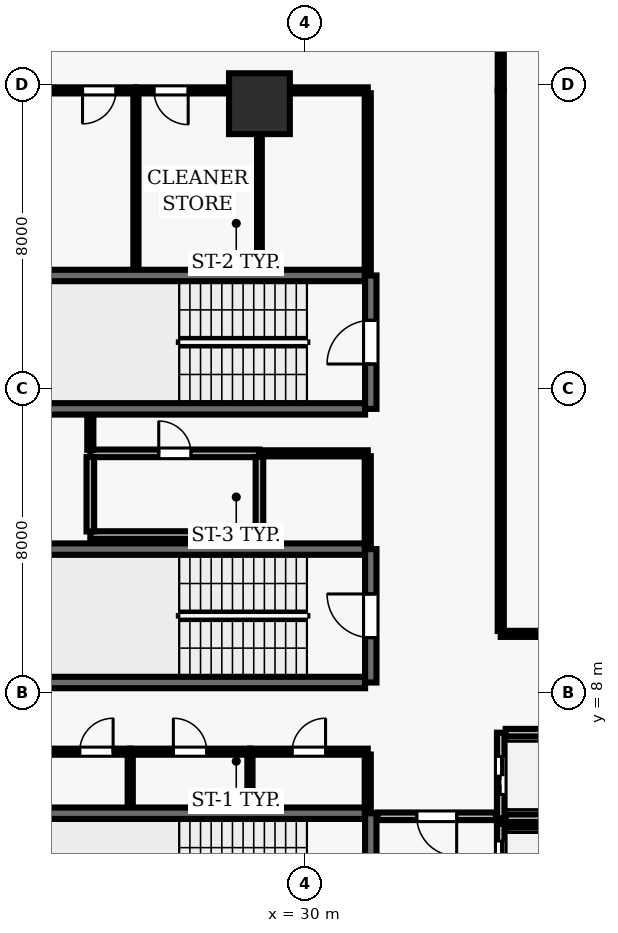
"""IFC4 building model, lengths in metres.
Left out: names, types, materials, properties, quantities, classifications, styles, units other than length and angle.
Written with IfcOpenShell. Run it as: python <this file> out.ifc"""

import sys

from ifc_helpers import new_model, si_unit, direction, frame, frame_2d, origin, origin_2d, place, context, subcontext, project, spatial, rectangle, extrude, element, fill, save


model = new_model("IFC4")
c1 = context("Model", 3, precision=1e-05, world=origin(), true_north=direction((0.0, 1.0)))
c2 = subcontext(c1, "Body", "Model", "MODEL_VIEW")
j1 = project(units=[si_unit("LENGTHUNIT", "METRE"), si_unit("PLANEANGLEUNIT", "RADIAN")], contexts=[c1])
p1 = place(None, origin())
s1 = spatial("IfcSite", under=j1, at=p1, CompositionType="ELEMENT")
p2 = place(p1, origin())
s2 = spatial("IfcBuilding", under=s1, at=p2, CompositionType="ELEMENT")
p3 = place(p2, frame((0.0, 0.0, -9.0)))
s3 = spatial("IfcBuildingStorey", under=s2, at=p3, CompositionType="ELEMENT", Elevation=-9.0)
p4 = place(p3, frame((28.8, 23.5, 0.0), z_axis=(0.0, 0.0, 1.0), x_axis=(1.0, 0.0, 0.0)))
e1 = element("IfcColumn", 1, at=p4, inside=s3, PredefinedType="COLUMN", context=c2, shape_type="SweptSolid", body=[
    extrude(rectangle(XDim=1.6, YDim=1.6, at=origin_2d()), origin(), (0.0, 0.0, 1.0), 4.5),
])
p5 = place(p3, frame((31.58, 4.83, 0.0), z_axis=(0.0, 0.0, 1.0), x_axis=(-1.0, 0.0, 0.0)))
e2 = element("IfcWall", 2, at=p5, inside=s3, PredefinedType="SHEAR", context=c2, shape_type="SweptSolid", body=[
    extrude(rectangle(XDim=8.36, YDim=0.3, at=frame_2d((4.18, 0.0))), origin(), (0.0, 0.0, 1.0), 4.22),
])
p6 = place(p3, frame((31.73, 0.96, 0.0), z_axis=(0.0, 0.0, 1.0), x_axis=(0.0, 1.0, 0.0)))
e3 = element("IfcWall", 3, at=p6, inside=s3, PredefinedType="SHEAR", context=c2, shape_type="SweptSolid", body=[
    extrude(rectangle(XDim=3.87, YDim=0.3, at=frame_2d((1.935, 0.0))), origin(), (0.0, 0.0, 1.0), 4.22),
])
p7 = place(p6, frame((1.54, 0.0, 0.0)))
e4 = element("IfcOpeningElement", 4, at=p7, cuts=e3, PredefinedType="OPENING", context=c2, shape_type="SweptSolid", body=[
    extrude(rectangle(XDim=1.15, YDim=2.15, at=frame_2d((0.575, 1.075))), frame((0.0, 0.16, 0.0), z_axis=(0.0, -1.0, 0.0), x_axis=(1.0, 0.0, 0.0)), (0.0, 0.0, 1.0), 0.32),
])
for number, where, z_axis, x_axis in (
    (5, (31.58, 18.98, 0.0), (0.0, 0.0, 1.0), (-1.0, 0.0, 0.0)),
    (6, (23.22, 15.47, 0.0), (0.0, 0.0, 1.0), (1.0, 0.0, 0.0)),
):
    element("IfcWall", number, at=place(p3, frame(where, z_axis=z_axis, x_axis=x_axis)), inside=s3, PredefinedType="SHEAR", context=c2, shape_type="SweptSolid", body=[
        extrude(rectangle(XDim=8.36, YDim=0.3, at=frame_2d((4.18, 0.0))), origin(), (0.0, 0.0, 1.0), 4.22),
    ])
p8 = place(p3, frame((31.73, 15.47, 0.0), z_axis=(0.0, 0.0, 1.0), x_axis=(0.0, 1.0, 0.0)))
e7 = element("IfcWall", 7, at=p8, inside=s3, PredefinedType="SHEAR", context=c2, shape_type="SweptSolid", body=[
    extrude(rectangle(XDim=3.51, YDim=0.3, at=frame_2d((1.755, 0.0))), origin(), (0.0, 0.0, 1.0), 4.22),
])
p9 = place(p8, frame((1.18, 0.0, 0.0)))
e8 = element("IfcOpeningElement", 8, at=p9, cuts=e7, PredefinedType="OPENING", context=c2, shape_type="SweptSolid", body=[
    extrude(rectangle(XDim=1.15, YDim=2.15, at=frame_2d((0.575, 1.075))), frame((0.0, 0.16, 0.0), z_axis=(0.0, -1.0, 0.0), x_axis=(1.0, 0.0, 0.0)), (0.0, 0.0, 1.0), 0.32),
])
for number, where, z_axis, x_axis in (
    (9, (31.58, 11.78, 0.0), (0.0, 0.0, 1.0), (-1.0, 0.0, 0.0)),
    (10, (23.22, 8.27, 0.0), (0.0, 0.0, 1.0), (1.0, 0.0, 0.0)),
):
    element("IfcWall", number, at=place(p3, frame(where, z_axis=z_axis, x_axis=x_axis)), inside=s3, PredefinedType="SHEAR", context=c2, shape_type="SweptSolid", body=[
        extrude(rectangle(XDim=8.36, YDim=0.3, at=frame_2d((4.18, 0.0))), origin(), (0.0, 0.0, 1.0), 4.22),
    ])
p10 = place(p3, frame((31.73, 8.27, 0.0), z_axis=(0.0, 0.0, 1.0), x_axis=(0.0, 1.0, 0.0)))
e11 = element("IfcWall", 11, at=p10, inside=s3, PredefinedType="SHEAR", context=c2, shape_type="SweptSolid", body=[
    extrude(rectangle(XDim=3.51, YDim=0.3, at=frame_2d((1.755, 0.0))), origin(), (0.0, 0.0, 1.0), 4.22),
])
p11 = place(p10, frame((1.18, 0.0, 0.0)))
e12 = element("IfcOpeningElement", 12, at=p11, cuts=e11, PredefinedType="OPENING", context=c2, shape_type="SweptSolid", body=[
    extrude(rectangle(XDim=1.15, YDim=2.15, at=frame_2d((0.575, 1.075))), frame((0.0, 0.16, 0.0), z_axis=(0.0, -1.0, 0.0), x_axis=(1.0, 0.0, 0.0)), (0.0, 0.0, 1.0), 0.32),
])
p12 = place(p3, frame((35.15, 4.55, 0.0), z_axis=(0.0, 0.0, 1.0), x_axis=(0.0, -1.0, 0.0)))
e13 = element("IfcWall", 13, at=p12, inside=s3, PredefinedType="SOLIDWALL", context=c2, shape_type="SweptSolid", body=[
    extrude(rectangle(XDim=2.1, YDim=0.2, at=frame_2d((1.05, 0.0))), origin(), (0.0, 0.0, 1.0), 4.22),
])
p13 = place(p12, frame((0.45, 0.0, 0.0)))
e14 = element("IfcOpeningElement", 14, at=p13, cuts=e13, PredefinedType="OPENING", context=c2, shape_type="SweptSolid", body=[
    extrude(rectangle(XDim=1.2, YDim=2.15, at=frame_2d((0.6, 1.075))), frame((0.0, 0.11, 0.0), z_axis=(0.0, -1.0, 0.0), x_axis=(1.0, 0.0, 0.0)), (0.0, 0.0, 1.0), 0.22),
])
p14 = place(p3, frame((37.42, 4.55, 0.0), z_axis=(0.0, 0.0, 1.0), x_axis=(-1.0, 0.0, 0.0)))
e15 = element("IfcWall", 15, at=p14, inside=s3, PredefinedType="SOLIDWALL", context=c2, shape_type="SweptSolid", body=[
    extrude(rectangle(XDim=2.14, YDim=0.2, at=frame_2d((1.07, 0.0))), origin(), (0.0, 0.0, 1.0), 4.22),
])
p15 = place(p3, frame((35.15, 6.95, 0.0), z_axis=(0.0, 0.0, 1.0), x_axis=(0.0, -1.0, 0.0)))
e16 = element("IfcWall", 16, at=p15, inside=s3, PredefinedType="SOLIDWALL", context=c2, shape_type="SweptSolid", body=[
    extrude(rectangle(XDim=2.25, YDim=0.2, at=frame_2d((1.125, 0.0))), origin(), (0.0, 0.0, 1.0), 4.22),
])
p16 = place(p15, frame((0.625, 0.0, 0.0)))
e17 = element("IfcOpeningElement", 17, at=p16, cuts=e16, PredefinedType="OPENING", context=c2, shape_type="SweptSolid", body=[
    extrude(rectangle(XDim=1.0, YDim=2.1, at=frame_2d((0.5, 1.05))), frame((0.0, 0.11, 0.0), z_axis=(0.0, -1.0, 0.0), x_axis=(1.0, 0.0, 0.0)), (0.0, 0.0, 1.0), 0.22),
])
for number, where, z_axis, x_axis in (
    (18, (35.28, 4.7, 0.0), (0.0, 0.0, 1.0), (1.0, 0.0, 0.0)),
    (19, (37.42, 6.95, 0.0), (0.0, 0.0, 1.0), (-1.0, 0.0, 0.0)),
):
    element("IfcWall", number, at=place(p3, frame(where, z_axis=z_axis, x_axis=x_axis)), inside=s3, PredefinedType="SOLIDWALL", context=c2, shape_type="SweptSolid", body=[
        extrude(rectangle(XDim=2.14, YDim=0.2, at=frame_2d((1.07, 0.0))), origin(), (0.0, 0.0, 1.0), 4.22),
    ])
p17 = place(p3, frame((22.22, 6.45, 0.0), z_axis=(0.0, 0.0, 1.0), x_axis=(1.0, 0.0, 0.0)))
e20 = element("IfcWall", 20, at=p17, inside=s3, PredefinedType="PARTITIONING", context=c2, shape_type="SweptSolid", body=[
    extrude(rectangle(XDim=3.18, YDim=0.16, at=frame_2d((1.59, 0.0))), origin(), (0.0, 0.0, 1.0), 4.22),
])
p18 = place(p17, frame((1.85, 0.0, 0.0)))
e21 = element("IfcOpeningElement", 21, at=p18, cuts=e20, PredefinedType="OPENING", context=c2, shape_type="SweptSolid", body=[
    extrude(rectangle(XDim=0.88, YDim=2.1, at=frame_2d((0.44, 1.05))), frame((0.0, 0.09, 0.0), z_axis=(0.0, -1.0, 0.0), x_axis=(1.0, 0.0, 0.0)), (0.0, 0.0, 1.0), 0.18),
])
p19 = place(p3, frame((24.35, 12.15, 0.0), z_axis=(0.0, 0.0, 1.0), x_axis=(1.0, 0.0, 0.0)))
e22 = element("IfcWall", 22, at=p19, inside=s3, PredefinedType="SOLIDWALL", context=c2, shape_type="SweptSolid", body=[
    extrude(rectangle(XDim=4.45, YDim=0.2, at=frame_2d((2.225, 0.0))), origin(), (0.0, 0.0, 1.0), 4.22),
])
p20 = place(p3, frame((24.35, 14.3, 0.0), z_axis=(0.0, 0.0, 1.0), x_axis=(1.0, 0.0, 0.0)))
e23 = element("IfcWall", 23, at=p20, inside=s3, PredefinedType="SOLIDWALL", context=c2, shape_type="SweptSolid", body=[
    extrude(rectangle(XDim=4.45, YDim=0.2, at=frame_2d((2.225, 0.0))), origin(), (0.0, 0.0, 1.0), 3.365),
])
p21 = place(p20, frame((1.8, 0.0, 0.0)))
e24 = element("IfcOpeningElement", 24, at=p21, cuts=e23, PredefinedType="OPENING", context=c2, shape_type="SweptSolid", body=[
    extrude(rectangle(XDim=0.85, YDim=2.1, at=frame_2d((0.425, 1.05))), frame((0.0, 0.11, 0.0), z_axis=(0.0, -1.0, 0.0), x_axis=(1.0, 0.0, 0.0)), (0.0, 0.0, 1.0), 0.22),
])
p22 = place(p3, frame((25.4, 6.45, 0.0), z_axis=(0.0, 0.0, 1.0), x_axis=(1.0, 0.0, 0.0)))
e25 = element("IfcWall", 25, at=p22, inside=s3, PredefinedType="PARTITIONING", context=c2, shape_type="SweptSolid", body=[
    extrude(rectangle(XDim=3.15, YDim=0.16, at=frame_2d((1.575, 0.0))), origin(), (0.0, 0.0, 1.0), 4.22),
])
p23 = place(p22, frame((1.135, 0.0, 0.0)))
e26 = element("IfcOpeningElement", 26, at=p23, cuts=e25, PredefinedType="OPENING", context=c2, shape_type="SweptSolid", body=[
    extrude(rectangle(XDim=0.88, YDim=2.1, at=frame_2d((0.44, 1.05))), frame((0.0, 0.09, 0.0), z_axis=(0.0, -1.0, 0.0), x_axis=(1.0, 0.0, 0.0)), (0.0, 0.0, 1.0), 0.18),
])
p24 = place(p3, frame((25.55, 23.85, 0.0), z_axis=(0.0, 0.0, 1.0), x_axis=(-1.0, 0.0, 0.0)))
e27 = element("IfcWall", 27, at=p24, inside=s3, PredefinedType="PARTITIONING", context=c2, shape_type="SweptSolid", body=[
    extrude(rectangle(XDim=3.33, YDim=0.16, at=frame_2d((1.665, 0.0))), origin(), (0.0, 0.0, 1.0), 3.365),
])
p25 = place(p24, frame((0.525, 0.0, 0.0)))
e28 = element("IfcOpeningElement", 28, at=p25, cuts=e27, PredefinedType="OPENING", context=c2, shape_type="SweptSolid", body=[
    extrude(rectangle(XDim=0.88, YDim=2.1, at=frame_2d((0.44, 1.05))), frame((0.0, 0.09, 0.0), z_axis=(0.0, -1.0, 0.0), x_axis=(1.0, 0.0, 0.0)), (0.0, 0.0, 1.0), 0.18),
])
p26 = place(p3, frame((28.55, 6.45, 0.0), z_axis=(0.0, 0.0, 1.0), x_axis=(1.0, 0.0, 0.0)))
e29 = element("IfcWall", 29, at=p26, inside=s3, PredefinedType="PARTITIONING", context=c2, shape_type="SweptSolid", body=[
    extrude(rectangle(XDim=3.1, YDim=0.16, at=frame_2d((1.55, 0.0))), origin(), (0.0, 0.0, 1.0), 4.22),
])
p27 = place(p26, frame((1.11, 0.0, 0.0)))
e30 = element("IfcOpeningElement", 30, at=p27, cuts=e29, PredefinedType="OPENING", context=c2, shape_type="SweptSolid", body=[
    extrude(rectangle(XDim=0.88, YDim=2.1, at=frame_2d((0.44, 1.05))), frame((0.0, 0.09, 0.0), z_axis=(0.0, -1.0, 0.0), x_axis=(1.0, 0.0, 0.0)), (0.0, 0.0, 1.0), 0.18),
])
p28 = place(p3, frame((28.8, 14.3, 0.0), z_axis=(0.0, 0.0, 1.0), x_axis=(1.0, 0.0, 0.0)))
e31 = element("IfcWall", 31, at=p28, inside=s3, PredefinedType="PARTITIONING", context=c2, shape_type="SweptSolid", body=[
    extrude(rectangle(XDim=2.85, YDim=0.16, at=frame_2d((1.425, 0.0))), origin(), (0.0, 0.0, 1.0), 3.365),
])
p29 = place(p3, frame((28.8, 23.85, 0.0), z_axis=(0.0, 0.0, 1.0), x_axis=(-1.0, 0.0, 0.0)))
e32 = element("IfcWall", 32, at=p29, inside=s3, PredefinedType="PARTITIONING", context=c2, shape_type="SweptSolid", body=[
    extrude(rectangle(XDim=3.25, YDim=0.16, at=frame_2d((1.625, 0.0))), origin(), (0.0, 0.0, 1.0), 3.365),
])
p30 = place(p29, frame((1.875, 0.0, 0.0)))
e33 = element("IfcOpeningElement", 33, at=p30, cuts=e32, PredefinedType="OPENING", context=c2, shape_type="SweptSolid", body=[
    extrude(rectangle(XDim=0.9, YDim=2.1, at=frame_2d((0.45, 1.05))), frame((0.0, 0.09, 0.0), z_axis=(0.0, -1.0, 0.0), x_axis=(1.0, 0.0, 0.0)), (0.0, 0.0, 1.0), 0.18),
])
p31 = place(p3, frame((28.8, 23.85, 0.0), z_axis=(0.0, 0.0, 1.0), x_axis=(1.0, 0.0, 0.0)))
e34 = element("IfcWall", 34, at=p31, inside=s3, PredefinedType="PARTITIONING", context=c2, shape_type="SweptSolid", body=[
    extrude(rectangle(XDim=2.85, YDim=0.16, at=frame_2d((1.425, 0.0))), origin(), (0.0, 0.0, 1.0), 3.365),
])
p32 = place(p3, frame((35.02, 4.75, 0.0), z_axis=(0.0, 0.0, 1.0), x_axis=(-1.0, 0.0, 0.0)))
e35 = element("IfcWall", 35, at=p32, inside=s3, PredefinedType="SOLIDWALL", context=c2, shape_type="SweptSolid", body=[
    extrude(rectangle(XDim=3.11, YDim=0.2, at=frame_2d((1.555, 0.0))), origin(), (0.0, 0.0, 1.0), 4.22),
])
p33 = place(p32, frame((1.03, 0.0, 0.0)))
e36 = element("IfcOpeningElement", 36, at=p33, cuts=e35, PredefinedType="OPENING", context=c2, shape_type="SweptSolid", body=[
    extrude(rectangle(XDim=1.05, YDim=2.15, at=frame_2d((0.525, 1.075))), frame((0.0, 0.11, 0.0), z_axis=(0.0, -1.0, 0.0), x_axis=(1.0, 0.0, 0.0)), (0.0, 0.0, 1.0), 0.22),
])
p34 = place(p3, frame((38.05, 9.55, 0.0), z_axis=(0.0, 0.0, 1.0), x_axis=(-1.0, 0.0, 0.0)))
e37 = element("IfcWall", 37, at=p34, inside=s3, PredefinedType="PARTITIONING", context=c2, shape_type="SweptSolid", body=[
    extrude(rectangle(XDim=2.9, YDim=0.16, at=frame_2d((1.45, 0.0))), origin(), (0.0, 0.0, 1.0), 4.22),
])
p35 = place(p3, frame((24.35, 14.205, 0.0), z_axis=(0.0, 0.0, 1.0), x_axis=(0.0, -1.0, 0.0)))
e38 = element("IfcWall", 38, at=p35, inside=s3, PredefinedType="SOLIDWALL", context=c2, shape_type="SweptSolid", body=[
    extrude(rectangle(XDim=1.96, YDim=0.2, at=frame_2d((0.98, 0.0))), origin(), (0.0, 0.0, 1.0), 4.22),
])
p36 = place(p3, frame((24.35, 15.29, 0.0), z_axis=(0.0, 0.0, 1.0), x_axis=(0.0, -1.0, 0.0)))
e39 = element("IfcWall", 39, at=p36, inside=s3, PredefinedType="PARTITIONING", context=c2, shape_type="SweptSolid", body=[
    extrude(rectangle(XDim=0.895, YDim=0.16, at=frame_2d((0.448, 0.0))), origin(), (0.0, 0.0, 1.0), 4.22),
])
p37 = place(p3, frame((25.4, 5.01, 0.0), z_axis=(0.0, 0.0, 1.0), x_axis=(0.0, 1.0, 0.0)))
e40 = element("IfcWall", 40, at=p37, inside=s3, PredefinedType="PARTITIONING", context=c2, shape_type="SweptSolid", body=[
    extrude(rectangle(XDim=1.365, YDim=0.135, at=frame_2d((0.683, 0.0))), origin(), (0.0, 0.0, 1.0), 4.22),
])
p38 = place(p3, frame((25.55, 19.16, 0.0), z_axis=(0.0, 0.0, 1.0), x_axis=(0.0, 1.0, 0.0)))
e41 = element("IfcWall", 41, at=p38, inside=s3, PredefinedType="PARTITIONING", context=c2, shape_type="SweptSolid", body=[
    extrude(rectangle(XDim=4.615, YDim=0.135, at=frame_2d((2.308, 0.0))), origin(), (0.0, 0.0, 1.0), 4.22),
])
p39 = place(p3, frame((28.55, 5.01, 0.0), z_axis=(0.0, 0.0, 1.0), x_axis=(0.0, 1.0, 0.0)))
e42 = element("IfcWall", 42, at=p39, inside=s3, PredefinedType="PARTITIONING", context=c2, shape_type="SweptSolid", body=[
    extrude(rectangle(XDim=1.365, YDim=0.135, at=frame_2d((0.683, 0.0))), origin(), (0.0, 0.0, 1.0), 4.22),
])
p40 = place(p3, frame((28.8, 12.245, 0.0), z_axis=(0.0, 0.0, 1.0), x_axis=(0.0, 1.0, 0.0)))
e43 = element("IfcWall", 43, at=p40, inside=s3, PredefinedType="SOLIDWALL", context=c2, shape_type="SweptSolid", body=[
    extrude(rectangle(XDim=1.96, YDim=0.2, at=frame_2d((0.98, 0.0))), origin(), (0.0, 0.0, 1.0), 4.22),
])
p41 = place(p3, frame((28.8, 19.16, 0.0), z_axis=(0.0, 0.0, 1.0), x_axis=(0.0, 1.0, 0.0)))
e44 = element("IfcWall", 44, at=p41, inside=s3, PredefinedType="PARTITIONING", context=c2, shape_type="SweptSolid", body=[
    extrude(rectangle(XDim=4.615, YDim=0.125, at=frame_2d((2.308, 0.0))), origin(), (0.0, 0.0, 1.0), 4.22),
])
p42 = place(p3, frame((31.65, 4.86, 0.0), z_axis=(0.0, 0.0, 1.0), x_axis=(0.0, 1.0, 0.0)))
e45 = element("IfcWall", 45, at=p42, inside=s3, PredefinedType="PARTITIONING", context=c2, shape_type="SweptSolid", body=[
    extrude(rectangle(XDim=1.515, YDim=0.16, at=frame_2d((0.757, 0.0))), origin(), (0.0, 0.0, 1.0), 4.22),
])
p43 = place(p3, frame((31.65, 14.225, 0.0), z_axis=(0.0, 0.0, 1.0), x_axis=(0.0, -1.0, 0.0)))
e46 = element("IfcWall", 46, at=p43, inside=s3, PredefinedType="PARTITIONING", context=c2, shape_type="SweptSolid", body=[
    extrude(rectangle(XDim=2.415, YDim=0.16, at=frame_2d((1.208, 0.0))), origin(), (0.0, 0.0, 1.0), 4.22),
])
p44 = place(p3, frame((31.65, 23.775, 0.0), z_axis=(0.0, 0.0, 1.0), x_axis=(0.0, -1.0, 0.0)))
e47 = element("IfcWall", 47, at=p44, inside=s3, PredefinedType="PARTITIONING", context=c2, shape_type="SweptSolid", body=[
    extrude(rectangle(XDim=4.765, YDim=0.16, at=frame_2d((2.382, 0.0))), origin(), (0.0, 0.0, 1.0), 4.22),
])
p45 = place(p3, frame((35.15, 9.625, 0.0), z_axis=(0.0, 0.0, 1.0), x_axis=(0.0, 1.0, 0.0)))
e48 = element("IfcWall", 48, at=p45, inside=s3, PredefinedType="PARTITIONING", context=c2, shape_type="SweptSolid", body=[
    extrude(rectangle(XDim=14.225, YDim=0.16, at=frame_2d((7.113, 0.0))), origin(), (0.0, 0.0, 1.0), 4.22),
])
p46 = place(p3, frame((35.15, 23.85, 0.0), z_axis=(0.0, 0.0, 1.0), x_axis=(0.0, 1.0, 0.0)))
e49 = element("IfcWall", 49, at=p46, inside=s3, PredefinedType="PARTITIONING", context=c2, shape_type="SweptSolid", body=[
    extrude(rectangle(XDim=2.075, YDim=0.16, at=frame_2d((1.038, 0.0))), origin(), (0.0, 0.0, 1.0), 4.22),
])
p47 = place(p9, origin())
e50 = element("IfcDoor", 50, at=p47, inside=s3, OperationType="SINGLE_SWING_LEFT", PredefinedType="DOOR", context=c2, shape_type="SweptSolid", body=[
    extrude(rectangle(XDim=1.15, YDim=2.15, at=frame_2d((0.575, 1.075))), frame((0.0, 0.025, 0.0), z_axis=(0.0, -1.0, 0.0), x_axis=(1.0, 0.0, 0.0)), (0.0, 0.0, 1.0), 0.05),
])
fill(e8, e50)
p48 = place(p11, origin())
e51 = element("IfcDoor", 51, at=p48, inside=s3, OperationType="SINGLE_SWING_RIGHT", PredefinedType="DOOR", context=c2, shape_type="SweptSolid", body=[
    extrude(rectangle(XDim=1.15, YDim=2.15, at=frame_2d((0.575, 1.075))), frame((0.0, 0.025, 0.0), z_axis=(0.0, -1.0, 0.0), x_axis=(1.0, 0.0, 0.0)), (0.0, 0.0, 1.0), 0.05),
])
fill(e12, e51)
p49 = place(p13, origin())
e52 = element("IfcDoor", 52, at=p49, inside=s3, OperationType="DOUBLE_DOOR_SLIDING", PredefinedType="DOOR", context=c2, shape_type="SweptSolid", body=[
    extrude(rectangle(XDim=1.2, YDim=2.15, at=frame_2d((0.6, 1.075))), frame((0.0, 0.025, 0.0), z_axis=(0.0, -1.0, 0.0), x_axis=(1.0, 0.0, 0.0)), (0.0, 0.0, 1.0), 0.05),
])
fill(e14, e52)
p50 = place(p16, origin())
e53 = element("IfcDoor", 53, at=p50, inside=s3, OperationType="DOUBLE_DOOR_SLIDING", PredefinedType="DOOR", context=c2, shape_type="SweptSolid", body=[
    extrude(rectangle(XDim=1.0, YDim=2.1, at=frame_2d((0.5, 1.05))), frame((0.0, 0.025, 0.0), z_axis=(0.0, -1.0, 0.0), x_axis=(1.0, 0.0, 0.0)), (0.0, 0.0, 1.0), 0.05),
])
fill(e17, e53)
p51 = place(p33, origin())
e54 = element("IfcDoor", 54, at=p51, inside=s3, OperationType="SINGLE_SWING_LEFT", PredefinedType="DOOR", context=c2, shape_type="SweptSolid", body=[
    extrude(rectangle(XDim=1.05, YDim=2.15, at=frame_2d((0.525, 1.075))), frame((0.0, 0.025, 0.0), z_axis=(0.0, -1.0, 0.0), x_axis=(1.0, 0.0, 0.0)), (0.0, 0.0, 1.0), 0.05),
])
fill(e36, e54)
p52 = place(p18, origin())
e55 = element("IfcDoor", 55, at=p52, inside=s3, OperationType="SINGLE_SWING_RIGHT", PredefinedType="DOOR", context=c2, shape_type="SweptSolid", body=[
    extrude(rectangle(XDim=0.88, YDim=2.1, at=frame_2d((0.44, 1.05))), frame((0.0, 0.025, 0.0), z_axis=(0.0, -1.0, 0.0), x_axis=(1.0, 0.0, 0.0)), (0.0, 0.0, 1.0), 0.05),
])
fill(e21, e55)
p53 = place(p23, origin())
e56 = element("IfcDoor", 56, at=p53, inside=s3, OperationType="SINGLE_SWING_LEFT", PredefinedType="DOOR", context=c2, shape_type="SweptSolid", body=[
    extrude(rectangle(XDim=0.88, YDim=2.1, at=frame_2d((0.44, 1.05))), frame((0.0, 0.025, 0.0), z_axis=(0.0, -1.0, 0.0), x_axis=(1.0, 0.0, 0.0)), (0.0, 0.0, 1.0), 0.05),
])
fill(e26, e56)
p54 = place(p27, origin())
e57 = element("IfcDoor", 57, at=p54, inside=s3, OperationType="SINGLE_SWING_RIGHT", PredefinedType="DOOR", context=c2, shape_type="SweptSolid", body=[
    extrude(rectangle(XDim=0.88, YDim=2.1, at=frame_2d((0.44, 1.05))), frame((0.0, 0.025, 0.0), z_axis=(0.0, -1.0, 0.0), x_axis=(1.0, 0.0, 0.0)), (0.0, 0.0, 1.0), 0.05),
])
fill(e30, e57)
p55 = place(p21, origin())
e58 = element("IfcDoor", 58, at=p55, inside=s3, OperationType="SINGLE_SWING_LEFT", PredefinedType="DOOR", context=c2, shape_type="SweptSolid", body=[
    extrude(rectangle(XDim=0.85, YDim=2.1, at=frame_2d((0.425, 1.05))), frame((0.0, 0.025, 0.0), z_axis=(0.0, -1.0, 0.0), x_axis=(1.0, 0.0, 0.0)), (0.0, 0.0, 1.0), 0.05),
])
fill(e24, e58)
p56 = place(p25, origin())
e59 = element("IfcDoor", 59, at=p56, inside=s3, OperationType="SINGLE_SWING_RIGHT", PredefinedType="DOOR", context=c2, shape_type="SweptSolid", body=[
    extrude(rectangle(XDim=0.88, YDim=2.1, at=frame_2d((0.44, 1.05))), frame((0.0, 0.025, 0.0), z_axis=(0.0, -1.0, 0.0), x_axis=(1.0, 0.0, 0.0)), (0.0, 0.0, 1.0), 0.05),
])
fill(e28, e59)
p57 = place(p30, origin())
e60 = element("IfcDoor", 60, at=p57, inside=s3, OperationType="SINGLE_SWING_LEFT", PredefinedType="DOOR", context=c2, shape_type="SweptSolid", body=[
    extrude(rectangle(XDim=0.9, YDim=2.1, at=frame_2d((0.45, 1.05))), frame((0.0, 0.025, 0.0), z_axis=(0.0, -1.0, 0.0), x_axis=(1.0, 0.0, 0.0)), (0.0, 0.0, 1.0), 0.05),
])
fill(e33, e60)
save(model, sys.argv[1])
